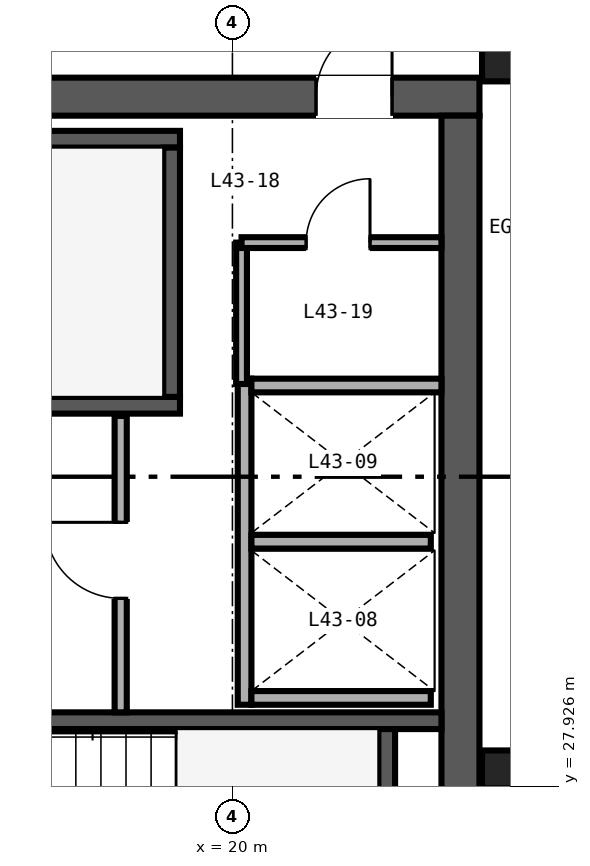
"""IFC4 building model, lengths in metres.
Left out: names, types, materials, properties, quantities, classifications, styles, units other than length and angle.
Written with IfcOpenShell. Run it as: python <this file> out.ifc"""

import sys

from ifc_helpers import new_model, si_unit, direction, frame, frame_2d, origin, origin_2d, place, context, subcontext, project, spatial, rectangle, i_section, extrude, source, transform, mapped, element, fill, save


model = new_model("IFC4")
c1 = context("Model", 3, precision=1e-05, world=origin(), true_north=direction((0.0, 1.0)))
c2 = subcontext(c1, "Body", "Model", "MODEL_VIEW")
j1 = project(units=[si_unit("LENGTHUNIT", "METRE"), si_unit("PLANEANGLEUNIT", "RADIAN")], contexts=[c1])
p1 = place(None, origin())
s1 = spatial("IfcSite", under=j1, at=p1, CompositionType="ELEMENT")
p2 = place(p1, origin())
s2 = spatial("IfcBuilding", under=s1, at=p2, CompositionType="ELEMENT")
p3 = place(p2, frame((0.0, 0.0, 174.0)))
s3 = spatial("IfcBuildingStorey", under=s2, at=p3, CompositionType="ELEMENT", Elevation=174.0)
p4 = place(p3, frame((10.75, 37.0, 0.0), z_axis=(0.0, 0.0, 1.0), x_axis=(1.0, 0.0, 0.0)))
e1 = element("IfcWall", 1, at=p4, inside=s3, PredefinedType="SHEAR", context=c2, shape_type="SweptSolid", body=[
    extrude(rectangle(XDim=12.5, YDim=0.5, at=frame_2d((6.25, 0.0))), origin(), (0.0, 0.0, 1.0), 3.37),
])
p5 = place(p4, frame((10.35, 0.0, 0.0)))
e2 = element("IfcOpeningElement", 2, at=p5, cuts=e1, PredefinedType="OPENING", context=c2, shape_type="SweptSolid", body=[
    extrude(rectangle(XDim=1.0, YDim=2.15, at=frame_2d((0.5, 1.075))), frame((0.0, 0.26, 0.0), z_axis=(0.0, -1.0, 0.0), x_axis=(1.0, 0.0, 0.0)), (0.0, 0.0, 1.0), 0.52),
])
p6 = place(p3, frame((23.0, 15.25, 0.0), z_axis=(0.0, 0.0, 1.0), x_axis=(0.0, 1.0, 0.0)))
e3 = element("IfcWall", 3, at=p6, inside=s3, PredefinedType="SHEAR", context=c2, shape_type="SweptSolid", body=[
    extrude(rectangle(XDim=21.5, YDim=0.5, at=frame_2d((10.75, 0.0))), origin(), (0.0, 0.0, 1.0), 3.37),
])
p7 = place(p3, frame((11.25, 32.94, 0.0), z_axis=(0.0, 0.0, 1.0), x_axis=(1.0, 0.0, 0.0)))
e4 = element("IfcWall", 4, at=p7, inside=s3, PredefinedType="SHEAR", context=c2, shape_type="SweptSolid", body=[
    extrude(rectangle(XDim=8.06, YDim=0.22, at=frame_2d((4.03, 0.0))), origin(), (0.0, 0.0, 1.0), 3.4),
])
p8 = place(p7, frame((0.67, 0.0, 0.0)))
e5 = element("IfcOpeningElement", 5, at=p8, cuts=e4, PredefinedType="OPENING", context=c2, shape_type="SweptSolid", body=[
    extrude(rectangle(XDim=1.05, YDim=2.15, at=frame_2d((0.525, 1.075))), frame((0.0, 0.12, 0.0), z_axis=(0.0, -1.0, 0.0), x_axis=(1.0, 0.0, 0.0)), (0.0, 0.0, 1.0), 0.24),
])
p9 = place(p3, frame((11.25, 36.44, 0.0), z_axis=(0.0, 0.0, 1.0), x_axis=(1.0, 0.0, 0.0)))
e6 = element("IfcWall", 6, at=p9, inside=s3, PredefinedType="SHEAR", context=c2, shape_type="SweptSolid", body=[
    extrude(rectangle(XDim=8.06, YDim=0.22, at=frame_2d((4.03, 0.0))), origin(), (0.0, 0.0, 1.0), 3.4),
])
p10 = place(p3, frame((19.2, 33.05, 0.0), z_axis=(0.0, 0.0, 1.0), x_axis=(0.0, 1.0, 0.0)))
e7 = element("IfcWall", 7, at=p10, inside=s3, PredefinedType="SHEAR", context=c2, shape_type="SweptSolid", body=[
    extrude(rectangle(XDim=3.28, YDim=0.22, at=frame_2d((1.64, 0.0))), origin(), (0.0, 0.0, 1.0), 3.4),
])
p11 = place(p3, frame((14.18, 28.79, 0.0), z_axis=(0.0, 0.0, 1.0), x_axis=(1.0, 0.0, 0.0)))
e8 = element("IfcWall", 8, at=p11, inside=s3, PredefinedType="SHEAR", context=c2, shape_type="SweptSolid", body=[
    extrude(rectangle(XDim=8.57, YDim=0.22, at=frame_2d((4.285, 0.0))), origin(), (0.0, 0.0, 1.0), 3.4),
])
p12 = place(p3, frame((22.03, 25.4, 0.0), z_axis=(0.0, 0.0, 1.0), x_axis=(0.0, 1.0, 0.0)))
e9 = element("IfcWall", 9, at=p12, inside=s3, PredefinedType="SHEAR", context=c2, shape_type="SweptSolid", body=[
    extrude(rectangle(XDim=3.28, YDim=0.22, at=frame_2d((1.64, 0.0))), origin(), (0.0, 0.0, 1.0), 3.4),
])
m1 = source(origin(), c2, "Body", "SweptSolid", [
    extrude(i_section(OverallWidth=0.432, OverallDepth=0.498, WebThickness=0.056, FlangeThickness=0.089, FilletRadius=0.025, at=origin_2d()), origin(), (0.0, 0.0, 1.0), 3.37),
])
for number, where, z_axis, x_axis in (
    (10, (23.5, 28.15, 0.0), (0.0, 0.0, 1.0), (1.0, 0.0, 0.0)),
    (11, (23.5, 37.45, 0.0), (0.0, 0.0, 1.0), (1.0, 0.0, 0.0)),
):
    element("IfcColumn", number, at=place(p3, frame(where, z_axis=z_axis, x_axis=x_axis)), inside=s3, PredefinedType="COLUMN", context=c2, shape_type="MappedRepresentation", body=[
        mapped(m1, transform((0.0, 0.0, 0.0), scale=1.0)),
    ])
p13 = place(p3, frame((20.16, 29.0, 0.0), z_axis=(0.0, 0.0, 1.0), x_axis=(0.0, 1.0, 0.0)))
e12 = element("IfcWall", 12, at=p13, inside=s3, PredefinedType="SOLIDWALL", context=c2, shape_type="SweptSolid", body=[
    extrude(rectangle(XDim=4.29, YDim=0.18, at=frame_2d((2.145, 0.0))), origin(), (0.0, 0.0, 1.0), 3.37),
])
p14 = place(p3, frame((20.25, 29.09, 0.0), z_axis=(0.0, 0.0, 1.0), x_axis=(1.0, 0.0, 0.0)))
e13 = element("IfcWall", 13, at=p14, inside=s3, PredefinedType="SOLIDWALL", context=c2, shape_type="SweptSolid", body=[
    extrude(rectangle(XDim=2.36, YDim=0.18, at=frame_2d((1.18, 0.0))), origin(), (0.0, 0.0, 1.0), 3.37),
])
p15 = place(p3, frame((20.25, 33.2, 0.0), z_axis=(0.0, 0.0, 1.0), x_axis=(1.0, 0.0, 0.0)))
e14 = element("IfcWall", 14, at=p15, inside=s3, PredefinedType="SOLIDWALL", context=c2, shape_type="SweptSolid", body=[
    extrude(rectangle(XDim=2.5, YDim=0.18, at=frame_2d((1.25, 0.0))), origin(), (0.0, 0.0, 1.0), 3.37),
])
p16 = place(p3, frame((20.25, 31.145, 0.0), z_axis=(0.0, 0.0, 1.0), x_axis=(1.0, 0.0, 0.0)))
e15 = element("IfcWall", 15, at=p16, inside=s3, PredefinedType="SOLIDWALL", context=c2, shape_type="SweptSolid", body=[
    extrude(rectangle(XDim=2.36, YDim=0.18, at=frame_2d((1.18, 0.0))), origin(), (0.0, 0.0, 1.0), 3.37),
])
p17 = place(p3, frame((18.53, 28.9, 0.0), z_axis=(0.0, 0.0, 1.0), x_axis=(0.0, 1.0, 0.0)))
e16 = element("IfcWall", 16, at=p17, inside=s3, PredefinedType="PARTITIONING", context=c2, shape_type="SweptSolid", body=[
    extrude(rectangle(XDim=3.9, YDim=0.16, at=frame_2d((1.95, 0.0))), origin(), (0.0, 0.0, 1.0), 3.37),
])
p18 = place(p17, frame((1.5, 0.0, 0.0)))
e17 = element("IfcOpeningElement", 17, at=p18, cuts=e16, PredefinedType="OPENING", context=c2, shape_type="SweptSolid", body=[
    extrude(rectangle(XDim=1.0, YDim=2.15, at=frame_2d((0.5, 1.075))), frame((0.0, 0.09, 0.0), z_axis=(0.0, -1.0, 0.0), x_axis=(1.0, 0.0, 0.0)), (0.0, 0.0, 1.0), 0.18),
])
p19 = place(p3, frame((20.12, 33.22, 0.0), z_axis=(0.0, 0.0, 1.0), x_axis=(0.0, 1.0, 0.0)))
e18 = element("IfcWall", 18, at=p19, inside=s3, PredefinedType="PARTITIONING", context=c2, shape_type="SweptSolid", body=[
    extrude(rectangle(XDim=1.86, YDim=0.142, at=frame_2d((0.93, 0.0))), origin(), (0.0, 0.0, 1.0), 3.37),
])
p20 = place(p3, frame((20.12, 35.08, 0.0), z_axis=(0.0, 0.0, 1.0), x_axis=(1.0, 0.0, 0.0)))
e19 = element("IfcWall", 19, at=p20, inside=s3, PredefinedType="PARTITIONING", context=c2, shape_type="SweptSolid", body=[
    extrude(rectangle(XDim=2.63, YDim=0.142, at=frame_2d((1.315, 0.0))), origin(), (0.0, 0.0, 1.0), 3.37),
])
p21 = place(p20, frame((0.85, 0.0, 0.0)))
e20 = element("IfcOpeningElement", 20, at=p21, cuts=e19, PredefinedType="OPENING", context=c2, shape_type="SweptSolid", body=[
    extrude(rectangle(XDim=0.84, YDim=2.1, at=frame_2d((0.42, 1.05))), frame((0.0, 0.081, 0.0), z_axis=(0.0, -1.0, 0.0), x_axis=(1.0, 0.0, 0.0)), (0.0, 0.0, 1.0), 0.162),
])
m2 = source(origin(), c2, "Body", "SweptSolid", [
    extrude(rectangle(XDim=1.0, YDim=2.15, at=frame_2d((0.5, 1.075))), frame((0.0, 0.025, 0.0), z_axis=(0.0, -1.0, 0.0), x_axis=(1.0, 0.0, 0.0)), (0.0, 0.0, 1.0), 0.05),
])
p22 = place(p18, origin())
e21 = element("IfcDoor", 21, at=p22, inside=s3, OperationType="SINGLE_SWING_RIGHT", PredefinedType="DOOR", context=c2, shape_type="MappedRepresentation", body=[
    mapped(m2, transform((0.0, 0.0, 0.0), scale=1.0)),
])
fill(e17, e21)
m3 = source(origin(), c2, "Body", "SweptSolid", [
    extrude(rectangle(XDim=0.84, YDim=2.1, at=frame_2d((0.42, 1.05))), frame((0.0, 0.025, 0.0), z_axis=(0.0, -1.0, 0.0), x_axis=(1.0, 0.0, 0.0)), (0.0, 0.0, 1.0), 0.05),
])
p23 = place(p21, origin())
e22 = element("IfcDoor", 22, at=p23, inside=s3, OperationType="SINGLE_SWING_RIGHT", PredefinedType="DOOR", context=c2, shape_type="MappedRepresentation", body=[
    mapped(m3, transform((0.0, 0.0, 0.0), scale=1.0)),
])
fill(e20, e22)
p24 = place(p5, origin())
e23 = element("IfcDoor", 23, at=p24, inside=s3, OperationType="SINGLE_SWING_RIGHT", PredefinedType="DOOR", context=c2, shape_type="MappedRepresentation", body=[
    mapped(m2, transform((0.0, 0.0, 0.0), scale=1.0)),
])
fill(e2, e23)
save(model, sys.argv[1])
